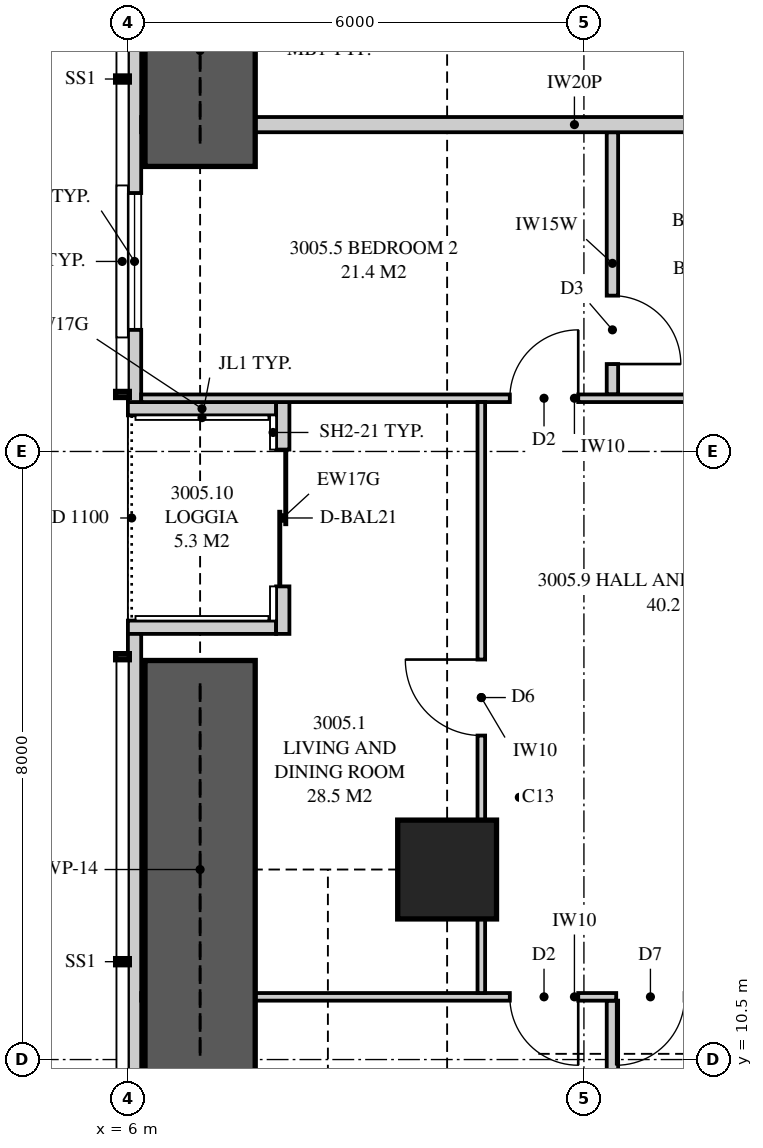
"""IFC4 building model, lengths in metres.
Left out: names, types, materials, properties, quantities, classifications, styles, units other than length and angle.
Written with IfcOpenShell. Run it as: python <this file> out.ifc"""

import sys

from ifc_helpers import new_model, si_unit, direction, frame, frame_2d, origin, origin_2d, place, context, subcontext, project, spatial, polyline, rectangle, outline, extrude, element, fill, save


model = new_model("IFC4")
c1 = context("Model", 3, precision=1e-05, world=origin(), true_north=direction((0.0, 1.0)))
c2 = subcontext(c1, "Body", "Model", "MODEL_VIEW")
j1 = project(units=[si_unit("LENGTHUNIT", "METRE"), si_unit("PLANEANGLEUNIT", "RADIAN")], contexts=[c1])
p1 = place(None, origin())
s1 = spatial("IfcSite", under=j1, at=p1, CompositionType="ELEMENT")
p2 = place(p1, origin())
s2 = spatial("IfcBuilding", under=s1, at=p2, CompositionType="ELEMENT")
p3 = place(p2, frame((0.0, 0.0, 111.55)))
s3 = spatial("IfcBuildingStorey", under=s2, at=p3, CompositionType="ELEMENT", Elevation=111.55)
p4 = place(p3, frame((10.2, 13.0, 0.0), z_axis=(0.0, 0.0, 1.0), x_axis=(1.0, 0.0, 0.0)))
e1 = element("IfcColumn", 1, at=p4, inside=s3, PredefinedType="COLUMN", context=c2, shape_type="SweptSolid", body=[
    extrude(rectangle(XDim=1.3, YDim=1.3, at=origin_2d()), origin(), (0.0, 0.0, 1.0), 3.35),
])
p5 = place(p3, frame((6.087, 34.949, 0.0), z_axis=(0.0, 0.0, 1.0), x_axis=(0.0, -1.0, 0.0)))
e2 = element("IfcWall", 2, at=p5, inside=s3, PredefinedType="SOLIDWALL", context=c2, shape_type="SweptSolid", body=[
    extrude(outline(polyline([(0.0, 0.0), (15.799, 0.0), (15.799, 2.15), (9.949, 2.15), (9.949, 3.11), (9.823, 3.11), (9.823, 2.15), (9.73, 2.15), (9.73, 3.11), (0.0, 3.11), (0.0, 0.0)])), frame((0.0, 0.087, 0.0), z_axis=(0.0, -1.0, 0.0), x_axis=(1.0, 0.0, 0.0)), (0.0, 0.0, 1.0), 0.175),
])
p6 = place(p5, frame((2.618, 0.0, 0.4)))
e3 = element("IfcOpeningElement", 3, at=p6, cuts=e2, PredefinedType="OPENING", context=c2, shape_type="SweptSolid", body=[
    extrude(rectangle(XDim=1.8, YDim=1.7, at=frame_2d((0.9, 0.85))), frame((0.0, 0.097, 0.0), z_axis=(0.0, -1.0, 0.0), x_axis=(1.0, 0.0, 0.0)), (0.0, 0.0, 1.0), 0.195),
])
p7 = place(p5, frame((5.899, 0.0, 0.4)))
e4 = element("IfcOpeningElement", 4, at=p7, cuts=e2, PredefinedType="OPENING", context=c2, shape_type="SweptSolid", body=[
    extrude(rectangle(XDim=1.2, YDim=1.7, at=frame_2d((0.6, 0.85))), frame((0.0, 0.097, 0.0), z_axis=(0.0, -1.0, 0.0), x_axis=(1.0, 0.0, 0.0)), (0.0, 0.0, 1.0), 0.195),
])
p8 = place(p5, frame((13.049, 0.0, 0.4)))
e5 = element("IfcOpeningElement", 5, at=p8, cuts=e2, PredefinedType="OPENING", context=c2, shape_type="SweptSolid", body=[
    extrude(rectangle(XDim=1.8, YDim=1.7, at=frame_2d((0.9, 0.85))), frame((0.0, 0.097, 0.0), z_axis=(0.0, -1.0, 0.0), x_axis=(1.0, 0.0, 0.0)), (0.0, 0.0, 1.0), 0.195),
])
p9 = place(p3, frame((6.087, 16.1, 0.0), z_axis=(0.0, 0.0, 1.0), x_axis=(0.0, -1.0, 0.0)))
e6 = element("IfcWall", 6, at=p9, inside=s3, PredefinedType="SOLIDWALL", context=c2, shape_type="SweptSolid", body=[
    extrude(outline(polyline([(0.0, 0.0), (13.049, 0.0), (13.049, 3.11), (3.319, 3.11), (3.319, 2.15), (3.226, 2.15), (3.226, 3.11), (3.1, 3.11), (3.1, 2.15), (0.0, 2.15), (0.0, 0.0)])), frame((0.0, 0.087, 0.0), z_axis=(0.0, -1.0, 0.0), x_axis=(1.0, 0.0, 0.0)), (0.0, 0.0, 1.0), 0.175),
])
p10 = place(p9, frame((5.975, 0.0, 0.4)))
e7 = element("IfcOpeningElement", 7, at=p10, cuts=e6, PredefinedType="OPENING", context=c2, shape_type="SweptSolid", body=[
    extrude(rectangle(XDim=1.8, YDim=1.7, at=frame_2d((0.9, 0.85))), frame((0.0, 0.097, 0.0), z_axis=(0.0, -1.0, 0.0), x_axis=(1.0, 0.0, 0.0)), (0.0, 0.0, 1.0), 0.195),
])
p11 = place(p9, frame((9.131, 0.0, 0.4)))
e8 = element("IfcOpeningElement", 8, at=p11, cuts=e6, PredefinedType="OPENING", context=c2, shape_type="SweptSolid", body=[
    extrude(rectangle(XDim=1.8, YDim=1.7, at=frame_2d((0.9, 0.85))), frame((0.0, 0.097, 0.0), z_axis=(0.0, -1.0, 0.0), x_axis=(1.0, 0.0, 0.0)), (0.0, 0.0, 1.0), 0.195),
])
p12 = place(p3, frame((8.038, 19.15, 0.0), z_axis=(0.0, 0.0, 1.0), x_axis=(0.0, -1.0, 0.0)))
e9 = element("IfcWall", 9, at=p12, inside=s3, PredefinedType="SOLIDWALL", context=c2, shape_type="SweptSolid", body=[
    extrude(rectangle(XDim=3.05, YDim=0.175, at=frame_2d((1.525, 0.0))), origin(), (0.0, 0.0, 1.0), 3.11),
])
p13 = place(p12, frame((0.625, 0.0, 0.0)))
e10 = element("IfcOpeningElement", 10, at=p13, cuts=e9, PredefinedType="OPENING", context=c2, shape_type="SweptSolid", body=[
    extrude(rectangle(XDim=1.8, YDim=2.1, at=frame_2d((0.9, 1.05))), frame((0.0, 0.097, 0.0), z_axis=(0.0, -1.0, 0.0), x_axis=(1.0, 0.0, 0.0)), (0.0, 0.0, 1.0), 0.195),
])
for number, where, z_axis, x_axis in (
    (11, (6.0, 19.062, 0.0), (0.0, 0.0, 1.0), (1.0, 0.0, 0.0)),
    (12, (6.0, 16.188, 0.0), (0.0, 0.0, 1.0), (1.0, 0.0, 0.0)),
):
    element("IfcWall", number, at=place(p3, frame(where, z_axis=z_axis, x_axis=x_axis)), inside=s3, PredefinedType="SOLIDWALL", context=c2, shape_type="SweptSolid", body=[
        extrude(outline(polyline([(0.0, 0.0), (1.95, 0.0), (1.95, 3.11), (1.75, 3.11), (1.75, 2.15), (0.15, 2.15), (0.15, 3.11), (0.0, 3.11), (0.0, 0.0)])), frame((0.0, 0.087, 0.0), z_axis=(0.0, -1.0, 0.0), x_axis=(1.0, 0.0, 0.0)), (0.0, 0.0, 1.0), 0.175),
    ])
p14 = place(p3, frame((6.175, 22.8, 0.0), z_axis=(0.0, 0.0, 1.0), x_axis=(1.0, 0.0, 0.0)))
e13 = element("IfcWall", 13, at=p14, inside=s3, PredefinedType="PARTITIONING", context=c2, shape_type="SweptSolid", body=[
    extrude(outline(polyline([(0.0, 0.0), (11.4, 0.0), (11.4, 3.11), (5.335, 3.11), (5.335, 2.51), (2.715, 2.51), (2.715, 3.11), (1.685, 3.11), (1.685, 2.15), (0.0, 2.15), (0.0, 0.0)])), frame((0.0, 0.1, 0.0), z_axis=(0.0, -1.0, 0.0), x_axis=(1.0, 0.0, 0.0)), (0.0, 0.0, 1.0), 0.2),
])
p15 = place(p3, frame((6.175, 11.325, 0.0), z_axis=(0.0, 0.0, 1.0), x_axis=(1.0, 0.0, 0.0)))
e14 = element("IfcWall", 14, at=p15, inside=s3, PredefinedType="PARTITIONING", context=c2, shape_type="SweptSolid", body=[
    extrude(outline(polyline([(0.175, 3.11), (0.0, 3.11), (0.0, 0.0), (0.529, 0.0), (0.529, 0.325), (1.021, 0.325), (1.021, 0.0), (11.4, 0.0), (11.4, 3.11), (5.285, 3.11), (5.285, 2.51), (2.765, 2.51), (2.765, 3.11), (2.744, 3.11), (2.744, 2.541), (2.169, 2.541), (2.169, 3.11), (1.918, 3.11), (1.918, 2.15), (1.021, 2.15), (1.021, 1.825), (0.529, 1.825), (0.529, 2.15), (0.175, 2.15), (0.175, 3.11)])), frame((0.0, 0.05, 0.0), z_axis=(0.0, -1.0, 0.0), x_axis=(1.0, 0.0, 0.0)), (0.0, 0.0, 1.0), 0.1),
])
p16 = place(p15, frame((4.85, 0.0, 0.0)))
e15 = element("IfcOpeningElement", 15, at=p16, cuts=e14, PredefinedType="OPENING", context=c2, shape_type="SweptSolid", body=[
    extrude(rectangle(XDim=0.9, YDim=2.1, at=frame_2d((0.45, 1.05))), frame((0.0, 0.06, 0.0), z_axis=(0.0, -1.0, 0.0), x_axis=(1.0, 0.0, 0.0)), (0.0, 0.0, 1.0), 0.12),
])
p17 = place(p15, frame((6.25, 0.0, 0.0)))
e16 = element("IfcOpeningElement", 16, at=p17, cuts=e14, PredefinedType="OPENING", context=c2, shape_type="SweptSolid", body=[
    extrude(rectangle(XDim=0.9, YDim=2.1, at=frame_2d((0.45, 1.05))), frame((0.0, 0.06, 0.0), z_axis=(0.0, -1.0, 0.0), x_axis=(1.0, 0.0, 0.0)), (0.0, 0.0, 1.0), 0.12),
])
p18 = place(p15, frame((9.7, 0.0, 0.0)))
e17 = element("IfcOpeningElement", 17, at=p18, cuts=e14, PredefinedType="OPENING", context=c2, shape_type="SweptSolid", body=[
    extrude(rectangle(XDim=0.7, YDim=2.1, at=frame_2d((0.35, 1.05))), frame((0.0, 0.06, 0.0), z_axis=(0.0, -1.0, 0.0), x_axis=(1.0, 0.0, 0.0)), (0.0, 0.0, 1.0), 0.12),
])
p19 = place(p3, frame((6.175, 19.2, 0.0), z_axis=(0.0, 0.0, 1.0), x_axis=(1.0, 0.0, 0.0)))
e18 = element("IfcWall", 18, at=p19, inside=s3, PredefinedType="PARTITIONING", context=c2, shape_type="SweptSolid", body=[
    extrude(outline(polyline([(0.0, 0.0), (11.4, 0.0), (11.4, 3.11), (5.285, 3.11), (5.285, 2.51), (2.765, 2.51), (2.765, 3.11), (1.635, 3.11), (1.635, 2.15), (0.0, 2.15), (0.0, 3.11), (0.0, 0.0)])), frame((0.0, 0.05, 0.0), z_axis=(0.0, -1.0, 0.0), x_axis=(1.0, 0.0, 0.0)), (0.0, 0.0, 1.0), 0.1),
])
p20 = place(p19, frame((4.85, 0.0, 0.0)))
e19 = element("IfcOpeningElement", 19, at=p20, cuts=e18, PredefinedType="OPENING", context=c2, shape_type="SweptSolid", body=[
    extrude(rectangle(XDim=0.9, YDim=2.1, at=frame_2d((0.45, 1.05))), frame((0.0, 0.06, 0.0), z_axis=(0.0, -1.0, 0.0), x_axis=(1.0, 0.0, 0.0)), (0.0, 0.0, 1.0), 0.12),
])
p21 = place(p19, frame((9.7, 0.0, 0.0)))
e20 = element("IfcOpeningElement", 20, at=p21, cuts=e18, PredefinedType="OPENING", context=c2, shape_type="SweptSolid", body=[
    extrude(rectangle(XDim=0.7, YDim=2.1, at=frame_2d((0.35, 1.05))), frame((0.0, 0.06, 0.0), z_axis=(0.0, -1.0, 0.0), x_axis=(1.0, 0.0, 0.0)), (0.0, 0.0, 1.0), 0.12),
])
p22 = place(p3, frame((12.375, 7.825, 0.0), z_axis=(0.0, 0.0, 1.0), x_axis=(0.0, 1.0, 0.0)))
e21 = element("IfcWall", 21, at=p22, inside=s3, PredefinedType="PLUMBINGWALL", context=c2, shape_type="SweptSolid", body=[
    extrude(outline(polyline([(0.0, 0.0), (3.45, 0.0), (3.45, 3.11), (3.062, 3.11), (3.062, 2.541), (2.438, 2.541), (2.438, 3.11), (0.0, 3.11), (0.0, 0.0)])), frame((0.0, 0.075, 0.0), z_axis=(0.0, -1.0, 0.0), x_axis=(1.0, 0.0, 0.0)), (0.0, 0.0, 1.0), 0.15),
])
p23 = place(p3, frame((12.375, 19.25, 0.0), z_axis=(0.0, 0.0, 1.0), x_axis=(0.0, 1.0, 0.0)))
e22 = element("IfcWall", 22, at=p23, inside=s3, PredefinedType="PLUMBINGWALL", context=c2, shape_type="SweptSolid", body=[
    extrude(rectangle(XDim=3.45, YDim=0.15, at=frame_2d((1.725, 0.0))), origin(), (0.0, 0.0, 1.0), 3.11),
])
p24 = place(p23, frame((0.4, 0.0, 0.0)))
e23 = element("IfcOpeningElement", 23, at=p24, cuts=e22, PredefinedType="OPENING", context=c2, shape_type="SweptSolid", body=[
    extrude(rectangle(XDim=0.9, YDim=2.1, at=frame_2d((0.45, 1.05))), frame((0.0, 0.085, 0.0), z_axis=(0.0, -1.0, 0.0), x_axis=(1.0, 0.0, 0.0)), (0.0, 0.0, 1.0), 0.17),
])
p25 = place(p3, frame((10.65, 11.375, 0.0), z_axis=(0.0, 0.0, 1.0), x_axis=(0.0, 1.0, 0.0)))
e24 = element("IfcWall", 24, at=p25, inside=s3, PredefinedType="PARTITIONING", context=c2, shape_type="SweptSolid", body=[
    extrude(outline(polyline([(0.0, 0.0), (7.775, 0.0), (7.775, 3.11), (7.775, 2.51), (1.685, 2.51), (0.0, 2.51), (0.0, 3.11), (0.0, 0.0)])), frame((0.0, 0.05, 0.0), z_axis=(0.0, -1.0, 0.0), x_axis=(1.0, 0.0, 0.0)), (0.0, 0.0, 1.0), 0.1),
])
p26 = place(p25, frame((3.387, 0.0, 0.0)))
e25 = element("IfcOpeningElement", 25, at=p26, cuts=e24, PredefinedType="OPENING", context=c2, shape_type="SweptSolid", body=[
    extrude(rectangle(XDim=1.0, YDim=2.1, at=frame_2d((0.5, 1.05))), frame((0.0, 0.06, 0.0), z_axis=(0.0, -1.0, 0.0), x_axis=(1.0, 0.0, 0.0)), (0.0, 0.0, 1.0), 0.12),
])
for number, where, z_axis, x_axis in (
    (26, (6.95, 22.25, 0.0), (0.0, 0.0, 1.0), (0.0, 1.0, 0.0)),
    (27, (6.95, 10.25, 0.0), (0.0, 0.0, 1.0), (0.0, 1.0, 0.0)),
):
    element("IfcWall", number, at=place(p3, frame(where, z_axis=z_axis, x_axis=x_axis)), inside=s3, PredefinedType="SHEAR", context=c2, shape_type="SweptSolid", body=[
        extrude(rectangle(XDim=5.5, YDim=1.45, at=frame_2d((2.75, 0.0))), origin(), (0.0, 0.0, 1.0), 3.35),
    ])
p27 = place(p8, origin())
e28 = element("IfcWindow", 28, at=p27, inside=s3, PartitioningType="SINGLE_PANEL", PredefinedType="WINDOW", context=c2, shape_type="SweptSolid", body=[
    extrude(rectangle(XDim=1.8, YDim=1.7, at=frame_2d((0.9, 0.85))), frame((0.0, 0.03, 0.0), z_axis=(0.0, -1.0, 0.0), x_axis=(1.0, 0.0, 0.0)), (0.0, 0.0, 1.0), 0.06),
])
fill(e5, e28)
p28 = place(p13, origin())
e29 = element("IfcDoor", 29, at=p28, inside=s3, OperationType="SLIDING_TO_LEFT", PredefinedType="DOOR", context=c2, shape_type="SweptSolid", body=[
    extrude(rectangle(XDim=1.8, YDim=2.1, at=frame_2d((0.9, 1.05))), frame((0.0, 0.025, 0.0), z_axis=(0.0, -1.0, 0.0), x_axis=(1.0, 0.0, 0.0)), (0.0, 0.0, 1.0), 0.05),
])
fill(e10, e29)
p29 = place(p16, frame((0.9, 0.0, 0.0), z_axis=(0.0, 0.0, 1.0), x_axis=(-1.0, 0.0, 0.0)))
e30 = element("IfcDoor", 30, at=p29, inside=s3, OperationType="SINGLE_SWING_LEFT", PredefinedType="DOOR", context=c2, shape_type="SweptSolid", body=[
    extrude(rectangle(XDim=0.9, YDim=2.1, at=frame_2d((0.45, 1.05))), frame((0.0, 0.025, 0.0), z_axis=(0.0, -1.0, 0.0), x_axis=(1.0, 0.0, 0.0)), (0.0, 0.0, 1.0), 0.05),
])
fill(e15, e30)
p30 = place(p17, frame((0.9, 0.0, 0.0), z_axis=(0.0, 0.0, 1.0), x_axis=(-1.0, 0.0, 0.0)))
e31 = element("IfcDoor", 31, at=p30, inside=s3, OperationType="SINGLE_SWING_RIGHT", PredefinedType="DOOR", context=c2, shape_type="SweptSolid", body=[
    extrude(rectangle(XDim=0.9, YDim=2.1, at=frame_2d((0.45, 1.05))), frame((0.0, 0.025, 0.0), z_axis=(0.0, -1.0, 0.0), x_axis=(1.0, 0.0, 0.0)), (0.0, 0.0, 1.0), 0.05),
])
fill(e16, e31)
p31 = place(p20, origin())
e32 = element("IfcDoor", 32, at=p31, inside=s3, OperationType="SINGLE_SWING_RIGHT", PredefinedType="DOOR", context=c2, shape_type="SweptSolid", body=[
    extrude(rectangle(XDim=0.9, YDim=2.1, at=frame_2d((0.45, 1.05))), frame((0.0, 0.025, 0.0), z_axis=(0.0, -1.0, 0.0), x_axis=(1.0, 0.0, 0.0)), (0.0, 0.0, 1.0), 0.05),
])
fill(e19, e32)
p32 = place(p24, frame((0.9, 0.0, 0.0), z_axis=(0.0, 0.0, 1.0), x_axis=(-1.0, 0.0, 0.0)))
e33 = element("IfcDoor", 33, at=p32, inside=s3, OperationType="SINGLE_SWING_RIGHT", PredefinedType="DOOR", context=c2, shape_type="SweptSolid", body=[
    extrude(rectangle(XDim=0.9, YDim=2.1, at=frame_2d((0.45, 1.05))), frame((0.0, 0.025, 0.0), z_axis=(0.0, -1.0, 0.0), x_axis=(1.0, 0.0, 0.0)), (0.0, 0.0, 1.0), 0.05),
])
fill(e23, e33)
p33 = place(p26, origin())
e34 = element("IfcDoor", 34, at=p33, inside=s3, OperationType="SINGLE_SWING_RIGHT", PredefinedType="DOOR", context=c2, shape_type="SweptSolid", body=[
    extrude(rectangle(XDim=1.0, YDim=2.1, at=frame_2d((0.5, 1.05))), frame((0.0, 0.025, 0.0), z_axis=(0.0, -1.0, 0.0), x_axis=(1.0, 0.0, 0.0)), (0.0, 0.0, 1.0), 0.05),
])
fill(e25, e34)
save(model, sys.argv[1])
